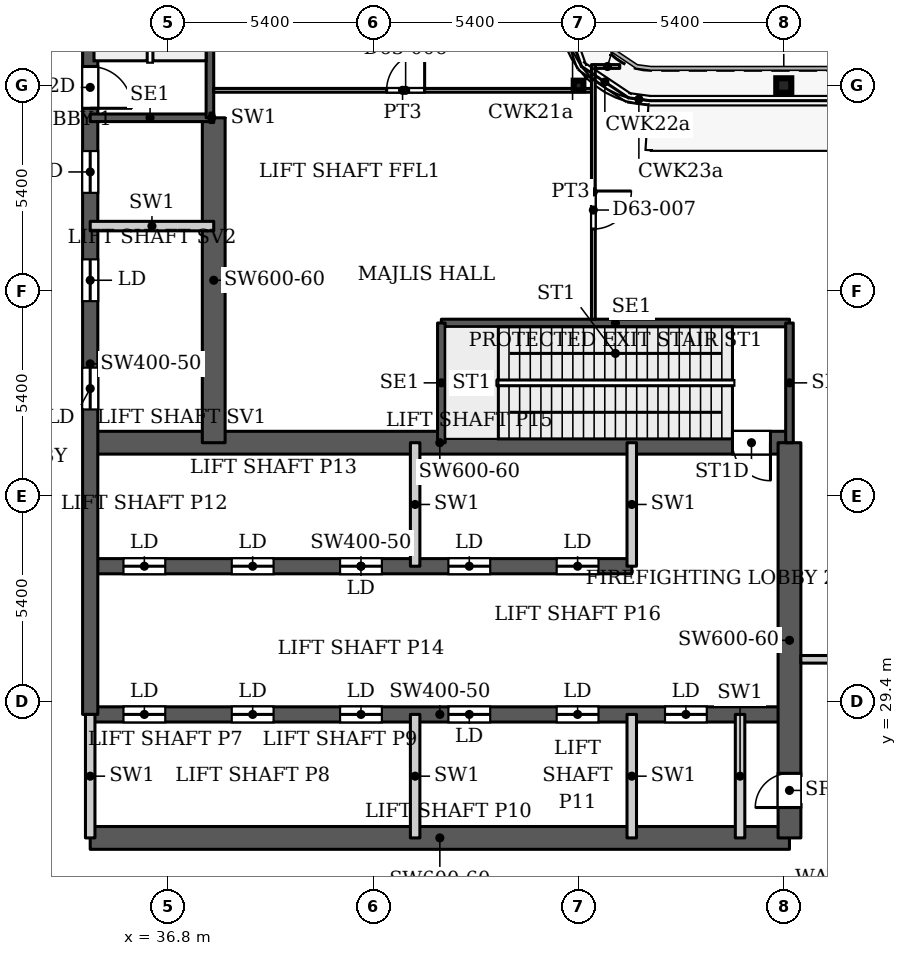
"""IFC4 building model, lengths in metres.
Left out: names, types, materials, properties, quantities, classifications, styles, units other than length and angle.
Written with IfcOpenShell. Run it as: python <this file> out.ifc"""

import sys

from ifc_helpers import new_model, si_unit, direction, frame, frame_2d, origin, origin_2d, place, context, subcontext, project, spatial, rectangle, hollow_rectangle, i_section, extrude, source, transform, mapped, element, fill, save


model = new_model("IFC4")
c1 = context("Model", 3, precision=1e-05, world=origin(), true_north=direction((0.0, 1.0)))
c2 = subcontext(c1, "Body", "Model", "MODEL_VIEW")
j1 = project(units=[si_unit("LENGTHUNIT", "METRE"), si_unit("PLANEANGLEUNIT", "RADIAN")], contexts=[c1])
p1 = place(None, origin())
s1 = spatial("IfcSite", under=j1, at=p1, CompositionType="ELEMENT")
p2 = place(p1, origin())
s2 = spatial("IfcBuilding", under=s1, at=p2, CompositionType="ELEMENT")
p3 = place(p2, frame((0.0, 0.0, 266.9)))
s3 = spatial("IfcBuildingStorey", under=s2, at=p3, CompositionType="ELEMENT", Elevation=266.9)
p4 = place(p3, frame((53.0, 45.6, 0.0), z_axis=(0.0, 0.0, 1.0), x_axis=(1.0, 0.0, 0.0)))
e1 = element("IfcColumn", 1, at=p4, inside=s3, PredefinedType="COLUMN", context=c2, shape_type="SweptSolid", body=[
    extrude(i_section(OverallWidth=0.395, OverallDepth=0.38, WebThickness=0.019, FlangeThickness=0.03, FilletRadius=0.011, at=origin_2d()), origin(), (0.0, 0.0, 1.0), 7.8),
])
p5 = place(p3, frame((47.6, 45.6, 0.0), z_axis=(0.0, 0.0, 1.0), x_axis=(1.0, 0.0, 0.0)))
e2 = element("IfcColumn", 2, at=p5, inside=s3, PredefinedType="COLUMN", context=c2, shape_type="SweptSolid", body=[
    extrude(hollow_rectangle(XDim=0.254, YDim=0.254, WallThickness=0.013, InnerFilletRadius=0.013, OuterFilletRadius=0.025, at=origin_2d()), origin(), (0.0, 0.0, 1.0), 7.8),
])
p6 = place(p3, frame((34.75, 25.8, 0.0), z_axis=(0.0, 0.0, 1.0), x_axis=(1.0, 0.0, 0.0)))
e3 = element("IfcWall", 3, at=p6, inside=s3, PredefinedType="SHEAR", context=c2, shape_type="SweptSolid", body=[
    extrude(rectangle(XDim=18.4, YDim=0.6, at=frame_2d((9.2, 0.0))), origin(), (0.0, 0.0, 1.0), 7.8),
])
p7 = place(p3, frame((34.75, 29.05, 0.0), z_axis=(0.0, 0.0, 1.0), x_axis=(1.0, 0.0, 0.0)))
e4 = element("IfcWall", 4, at=p7, inside=s3, PredefinedType="SHEAR", context=c2, shape_type="SweptSolid", body=[
    extrude(rectangle(XDim=18.4, YDim=0.4, at=frame_2d((9.2, 0.0))), origin(), (0.0, 0.0, 1.0), 7.8),
])
p8 = place(p7, frame((0.875, 0.0, 0.0)))
e5 = element("IfcOpeningElement", 5, at=p8, cuts=e4, PredefinedType="OPENING", context=c2, shape_type="SweptSolid", body=[
    extrude(rectangle(XDim=1.1, YDim=2.2, at=frame_2d((0.55, 1.1))), frame((0.0, 0.21, 0.0), z_axis=(0.0, -1.0, 0.0), x_axis=(1.0, 0.0, 0.0)), (0.0, 0.0, 1.0), 0.42),
])
p9 = place(p7, frame((3.725, 0.0, 0.0)))
e6 = element("IfcOpeningElement", 6, at=p9, cuts=e4, PredefinedType="OPENING", context=c2, shape_type="SweptSolid", body=[
    extrude(rectangle(XDim=1.1, YDim=2.2, at=frame_2d((0.55, 1.1))), frame((0.0, 0.21, 0.0), z_axis=(0.0, -1.0, 0.0), x_axis=(1.0, 0.0, 0.0)), (0.0, 0.0, 1.0), 0.42),
])
p10 = place(p7, frame((6.575, 0.0, 0.0)))
e7 = element("IfcOpeningElement", 7, at=p10, cuts=e4, PredefinedType="OPENING", context=c2, shape_type="SweptSolid", body=[
    extrude(rectangle(XDim=1.1, YDim=2.2, at=frame_2d((0.55, 1.1))), frame((0.0, 0.21, 0.0), z_axis=(0.0, -1.0, 0.0), x_axis=(1.0, 0.0, 0.0)), (0.0, 0.0, 1.0), 0.42),
])
p11 = place(p7, frame((9.425, 0.0, 0.0)))
e8 = element("IfcOpeningElement", 8, at=p11, cuts=e4, PredefinedType="OPENING", context=c2, shape_type="SweptSolid", body=[
    extrude(rectangle(XDim=1.1, YDim=2.2, at=frame_2d((0.55, 1.1))), frame((0.0, 0.21, 0.0), z_axis=(0.0, -1.0, 0.0), x_axis=(1.0, 0.0, 0.0)), (0.0, 0.0, 1.0), 0.42),
])
p12 = place(p7, frame((12.275, 0.0, 0.0)))
e9 = element("IfcOpeningElement", 9, at=p12, cuts=e4, PredefinedType="OPENING", context=c2, shape_type="SweptSolid", body=[
    extrude(rectangle(XDim=1.1, YDim=2.2, at=frame_2d((0.55, 1.1))), frame((0.0, 0.21, 0.0), z_axis=(0.0, -1.0, 0.0), x_axis=(1.0, 0.0, 0.0)), (0.0, 0.0, 1.0), 0.42),
])
p13 = place(p7, frame((15.125, 0.0, 0.0)))
e10 = element("IfcOpeningElement", 10, at=p13, cuts=e4, PredefinedType="OPENING", context=c2, shape_type="SweptSolid", body=[
    extrude(rectangle(XDim=1.1, YDim=2.2, at=frame_2d((0.55, 1.1))), frame((0.0, 0.21, 0.0), z_axis=(0.0, -1.0, 0.0), x_axis=(1.0, 0.0, 0.0)), (0.0, 0.0, 1.0), 0.42),
])
p14 = place(p3, frame((34.75, 32.95, 0.0), z_axis=(0.0, 0.0, 1.0), x_axis=(1.0, 0.0, 0.0)))
e11 = element("IfcWall", 11, at=p14, inside=s3, PredefinedType="SHEAR", context=c2, shape_type="SweptSolid", body=[
    extrude(rectangle(XDim=14.25, YDim=0.4, at=frame_2d((7.125, 0.0))), origin(), (0.0, 0.0, 1.0), 7.8),
])
p15 = place(p14, frame((0.875, 0.0, 0.0)))
e12 = element("IfcOpeningElement", 12, at=p15, cuts=e11, PredefinedType="OPENING", context=c2, shape_type="SweptSolid", body=[
    extrude(rectangle(XDim=1.1, YDim=2.2, at=frame_2d((0.55, 1.1))), frame((0.0, 0.21, 0.0), z_axis=(0.0, -1.0, 0.0), x_axis=(1.0, 0.0, 0.0)), (0.0, 0.0, 1.0), 0.42),
])
p16 = place(p14, frame((3.725, 0.0, 0.0)))
e13 = element("IfcOpeningElement", 13, at=p16, cuts=e11, PredefinedType="OPENING", context=c2, shape_type="SweptSolid", body=[
    extrude(rectangle(XDim=1.1, YDim=2.2, at=frame_2d((0.55, 1.1))), frame((0.0, 0.21, 0.0), z_axis=(0.0, -1.0, 0.0), x_axis=(1.0, 0.0, 0.0)), (0.0, 0.0, 1.0), 0.42),
])
p17 = place(p14, frame((6.575, 0.0, 0.0)))
e14 = element("IfcOpeningElement", 14, at=p17, cuts=e11, PredefinedType="OPENING", context=c2, shape_type="SweptSolid", body=[
    extrude(rectangle(XDim=1.1, YDim=2.2, at=frame_2d((0.55, 1.1))), frame((0.0, 0.21, 0.0), z_axis=(0.0, -1.0, 0.0), x_axis=(1.0, 0.0, 0.0)), (0.0, 0.0, 1.0), 0.42),
])
p18 = place(p14, frame((9.425, 0.0, 0.0)))
e15 = element("IfcOpeningElement", 15, at=p18, cuts=e11, PredefinedType="OPENING", context=c2, shape_type="SweptSolid", body=[
    extrude(rectangle(XDim=1.1, YDim=2.2, at=frame_2d((0.55, 1.1))), frame((0.0, 0.21, 0.0), z_axis=(0.0, -1.0, 0.0), x_axis=(1.0, 0.0, 0.0)), (0.0, 0.0, 1.0), 0.42),
])
p19 = place(p14, frame((12.275, 0.0, 0.0)))
e16 = element("IfcOpeningElement", 16, at=p19, cuts=e11, PredefinedType="OPENING", context=c2, shape_type="SweptSolid", body=[
    extrude(rectangle(XDim=1.1, YDim=2.2, at=frame_2d((0.55, 1.1))), frame((0.0, 0.21, 0.0), z_axis=(0.0, -1.0, 0.0), x_axis=(1.0, 0.0, 0.0)), (0.0, 0.0, 1.0), 0.42),
])
p20 = place(p3, frame((34.75, 36.2, 0.0), z_axis=(0.0, 0.0, 1.0), x_axis=(1.0, 0.0, 0.0)))
e17 = element("IfcWall", 17, at=p20, inside=s3, PredefinedType="SHEAR", context=c2, shape_type="SweptSolid", body=[
    extrude(rectangle(XDim=18.4, YDim=0.6, at=frame_2d((9.2, 0.0))), origin(), (0.0, 0.0, 1.0), 7.8),
])
p21 = place(p20, frame((16.9, 0.0, 0.0)))
e18 = element("IfcOpeningElement", 18, at=p21, cuts=e17, PredefinedType="OPENING", context=c2, shape_type="SweptSolid", body=[
    extrude(rectangle(XDim=1.0, YDim=2.2, at=frame_2d((0.5, 1.1))), frame((0.0, 0.31, 0.0), z_axis=(0.0, -1.0, 0.0), x_axis=(1.0, 0.0, 0.0)), (0.0, 0.0, 1.0), 0.62),
])
p22 = place(p3, frame((34.75, 29.05, 0.0), z_axis=(0.0, 0.0, 1.0), x_axis=(0.0, 1.0, 0.0)))
e19 = element("IfcWall", 19, at=p22, inside=s3, PredefinedType="SHEAR", context=c2, shape_type="SweptSolid", body=[
    extrude(rectangle(XDim=18.45, YDim=0.4, at=frame_2d((9.225, 0.0))), origin(), (0.0, 0.0, 1.0), 7.8),
])
p23 = place(p22, frame((8.025, 0.0, 0.0)))
e20 = element("IfcOpeningElement", 20, at=p23, cuts=e19, PredefinedType="OPENING", context=c2, shape_type="SweptSolid", body=[
    extrude(rectangle(XDim=1.1, YDim=2.2, at=frame_2d((0.55, 1.1))), frame((0.0, 0.21, 0.0), z_axis=(0.0, -1.0, 0.0), x_axis=(1.0, 0.0, 0.0)), (0.0, 0.0, 1.0), 0.42),
])
p24 = place(p22, frame((10.875, 0.0, 0.0)))
e21 = element("IfcOpeningElement", 21, at=p24, cuts=e19, PredefinedType="OPENING", context=c2, shape_type="SweptSolid", body=[
    extrude(rectangle(XDim=1.1, YDim=2.2, at=frame_2d((0.55, 1.1))), frame((0.0, 0.21, 0.0), z_axis=(0.0, -1.0, 0.0), x_axis=(1.0, 0.0, 0.0)), (0.0, 0.0, 1.0), 0.42),
])
p25 = place(p22, frame((13.725, 0.0, 0.0)))
e22 = element("IfcOpeningElement", 22, at=p25, cuts=e19, PredefinedType="OPENING", context=c2, shape_type="SweptSolid", body=[
    extrude(rectangle(XDim=1.1, YDim=2.2, at=frame_2d((0.55, 1.1))), frame((0.0, 0.21, 0.0), z_axis=(0.0, -1.0, 0.0), x_axis=(1.0, 0.0, 0.0)), (0.0, 0.0, 1.0), 0.42),
])
p26 = place(p22, frame((15.95, 0.0, 0.0)))
e23 = element("IfcOpeningElement", 23, at=p26, cuts=e19, PredefinedType="OPENING", context=c2, shape_type="SweptSolid", body=[
    extrude(rectangle(XDim=1.1, YDim=2.2, at=frame_2d((0.55, 1.1))), frame((0.0, 0.21, 0.0), z_axis=(0.0, -1.0, 0.0), x_axis=(1.0, 0.0, 0.0)), (0.0, 0.0, 1.0), 0.42),
])
p27 = place(p3, frame((38.0, 36.2, 0.0), z_axis=(0.0, 0.0, 1.0), x_axis=(0.0, 1.0, 0.0)))
e24 = element("IfcWall", 24, at=p27, inside=s3, PredefinedType="SHEAR", context=c2, shape_type="SweptSolid", body=[
    extrude(rectangle(XDim=8.55, YDim=0.6, at=frame_2d((4.275, 0.0))), origin(), (0.0, 0.0, 1.0), 7.8),
])
p28 = place(p3, frame((53.15, 25.8, 0.0), z_axis=(0.0, 0.0, 1.0), x_axis=(0.0, 1.0, 0.0)))
e25 = element("IfcWall", 25, at=p28, inside=s3, PredefinedType="SHEAR", context=c2, shape_type="SweptSolid", body=[
    extrude(rectangle(XDim=10.4, YDim=0.6, at=frame_2d((5.2, 0.0))), origin(), (0.0, 0.0, 1.0), 7.8),
])
p29 = place(p28, frame((0.8, 0.0, 0.0)))
e26 = element("IfcOpeningElement", 26, at=p29, cuts=e25, PredefinedType="OPENING", context=c2, shape_type="SweptSolid", body=[
    extrude(rectangle(XDim=0.9, YDim=2.2, at=frame_2d((0.45, 1.1))), frame((0.0, 0.31, 0.0), z_axis=(0.0, -1.0, 0.0), x_axis=(1.0, 0.0, 0.0)), (0.0, 0.0, 1.0), 0.62),
])
p30 = place(p3, frame((43.99, 39.35, 0.0), z_axis=(0.0, 0.0, 1.0), x_axis=(1.0, 0.0, 0.0)))
e27 = element("IfcWall", 27, at=p30, inside=s3, PredefinedType="SHEAR", context=c2, shape_type="SweptSolid", body=[
    extrude(rectangle(XDim=9.16, YDim=0.2, at=frame_2d((4.58, 0.0))), origin(), (0.0, 0.0, 1.0), 7.8),
])
for number, where, z_axis, x_axis in (
    (28, (43.99, 36.2, 0.0), (0.0, 0.0, 1.0), (0.0, 1.0, 0.0)),
    (29, (53.15, 36.2, 0.0), (0.0, 0.0, 1.0), (0.0, 1.0, 0.0)),
):
    element("IfcWall", number, at=place(p3, frame(where, z_axis=z_axis, x_axis=x_axis)), inside=s3, PredefinedType="SHEAR", context=c2, shape_type="SweptSolid", body=[
        extrude(rectangle(XDim=3.15, YDim=0.2, at=frame_2d((1.575, 0.0))), origin(), (0.0, 0.0, 1.0), 7.8),
    ])
p31 = place(p3, frame((34.75, 44.75, 0.0), z_axis=(0.0, 0.0, 1.0), x_axis=(1.0, 0.0, 0.0)))
e30 = element("IfcWall", 30, at=p31, inside=s3, PredefinedType="SHEAR", context=c2, shape_type="SweptSolid", body=[
    extrude(rectangle(XDim=3.15, YDim=0.2, at=frame_2d((1.575, 0.0))), origin(), (0.0, 0.0, 1.0), 7.8),
])
p32 = place(p3, frame((37.9, 44.75, 0.0), z_axis=(0.0, 0.0, 1.0), x_axis=(0.0, 1.0, 0.0)))
e31 = element("IfcWall", 31, at=p32, inside=s3, PredefinedType="SHEAR", context=c2, shape_type="SweptSolid", body=[
    extrude(rectangle(XDim=9.16, YDim=0.2, at=frame_2d((4.58, 0.0))), origin(), (0.0, 0.0, 1.0), 7.8),
])
for number, where, z_axis, x_axis in (
    (32, (34.75, 25.8, 0.0), (0.0, 0.0, 1.0), (0.0, 1.0, 0.0)),
    (33, (43.3, 25.8, 0.0), (0.0, 0.0, 1.0), (0.0, 1.0, 0.0)),
    (34, (43.3, 32.95, 0.0), (0.0, 0.0, 1.0), (0.0, 1.0, 0.0)),
    (35, (49.0, 25.8, 0.0), (0.0, 0.0, 1.0), (0.0, 1.0, 0.0)),
    (36, (49.0, 32.95, 0.0), (0.0, 0.0, 1.0), (0.0, 1.0, 0.0)),
    (37, (51.85, 25.8, 0.0), (0.0, 0.0, 1.0), (0.0, 1.0, 0.0)),
    (38, (34.75, 41.9, 0.0), (0.0, 0.0, 1.0), (1.0, 0.0, 0.0)),
):
    element("IfcWall", number, at=place(p3, frame(where, z_axis=z_axis, x_axis=x_axis)), inside=s3, PredefinedType="PARTITIONING", context=c2, shape_type="SweptSolid", body=[
        extrude(rectangle(XDim=3.25, YDim=0.25, at=frame_2d((1.625, 0.0))), origin(), (0.0, 0.0, 1.0), 7.8),
    ])
p33 = place(p3, frame((37.9, 44.75, 0.0), z_axis=(0.0, 0.0, 1.0), x_axis=(1.0, 0.0, 0.0)))
e39 = element("IfcWall", 39, at=p33, inside=s3, PredefinedType="PARTITIONING", context=c2, shape_type="SweptSolid", body=[
    extrude(rectangle(XDim=0.1, YDim=0.25, at=frame_2d((0.05, 0.0))), origin(), (0.0, 0.0, 1.0), 7.8),
])
p34 = place(p3, frame((37.999, 45.473, 0.0), z_axis=(0.0, 0.0, 1.0), x_axis=(1.0, 0.0, 0.0)))
e40 = element("IfcWall", 40, at=p34, inside=s3, PredefinedType="PARTITIONING", context=c2, shape_type="SweptSolid", body=[
    extrude(rectangle(XDim=9.941, YDim=0.1, at=frame_2d((4.97, 0.0))), origin(), (0.0, 0.0, 1.0), 7.5),
])
p35 = place(p34, frame((4.551, 0.0, 0.0)))
e41 = element("IfcOpeningElement", 41, at=p35, cuts=e40, PredefinedType="OPENING", context=c2, shape_type="SweptSolid", body=[
    extrude(rectangle(XDim=1.0, YDim=2.1, at=frame_2d((0.5, 1.05))), frame((0.0, 0.06, 0.0), z_axis=(0.0, -1.0, 0.0), x_axis=(1.0, 0.0, 0.0)), (0.0, 0.0, 1.0), 0.12),
])
p36 = place(p3, frame((47.99, 39.449, 0.0), z_axis=(0.0, 0.0, 1.0), x_axis=(0.0, 1.0, 0.0)))
e42 = element("IfcWall", 42, at=p36, inside=s3, PredefinedType="PARTITIONING", context=c2, shape_type="SweptSolid", body=[
    extrude(rectangle(XDim=6.701, YDim=0.1, at=frame_2d((3.351, 0.0))), origin(), (0.0, 0.0, 1.0), 7.5),
])
p37 = place(p36, frame((2.374, 0.0, 0.0)))
e43 = element("IfcOpeningElement", 43, at=p37, cuts=e42, PredefinedType="OPENING", context=c2, shape_type="SweptSolid", body=[
    extrude(rectangle(XDim=1.0, YDim=2.1, at=frame_2d((0.5, 1.05))), frame((0.0, 0.06, 0.0), z_axis=(0.0, -1.0, 0.0), x_axis=(1.0, 0.0, 0.0)), (0.0, 0.0, 1.0), 0.12),
])
p38 = place(p3, frame((48.04, 46.1, 0.0), z_axis=(0.0, 0.0, 1.0), x_axis=(1.0, 0.0, 0.0)))
e44 = element("IfcWall", 44, at=p38, inside=s3, PredefinedType="PARTITIONING", context=c2, shape_type="SweptSolid", body=[
    extrude(rectangle(XDim=0.644, YDim=0.1, at=frame_2d((0.322, 0.0))), origin(), (0.0, 0.0, 1.0), 7.5),
])
p39 = place(p3, frame((53.449, 30.5, 0.0), z_axis=(0.0, 0.0, 1.0), x_axis=(1.0, 0.0, 0.0)))
e45 = element("IfcWall", 45, at=p39, inside=s3, PredefinedType="PARTITIONING", context=c2, shape_type="SweptSolid", body=[
    extrude(rectangle(XDim=6.454, YDim=0.2, at=frame_2d((3.227, 0.0))), origin(), (0.0, 0.0, 1.0), 7.5),
])
p40 = place(p39, frame((2.153, 0.0, 0.0)))
e46 = element("IfcOpeningElement", 46, at=p40, cuts=e45, PredefinedType="OPENING", context=c2, shape_type="SweptSolid", body=[
    extrude(rectangle(XDim=1.8, YDim=2.1, at=frame_2d((0.9, 1.05))), frame((0.0, 0.11, 0.0), z_axis=(0.0, -1.0, 0.0), x_axis=(1.0, 0.0, 0.0)), (0.0, 0.0, 1.0), 0.22),
])
m1 = source(origin(), c2, "Body", "SweptSolid", [
    extrude(rectangle(XDim=1.1, YDim=2.2, at=frame_2d((0.55, 1.1))), frame((0.0, 0.025, 0.0), z_axis=(0.0, -1.0, 0.0), x_axis=(1.0, 0.0, 0.0)), (0.0, 0.0, 1.0), 0.05),
])
p41 = place(p8, origin())
e47 = element("IfcDoor", 47, at=p41, inside=s3, OperationType="SLIDING_TO_LEFT", PredefinedType="DOOR", context=c2, shape_type="MappedRepresentation", body=[
    mapped(m1, transform((0.0, 0.0, 0.0), x_axis=(1.0, 0.0, 0.0), y_axis=(0.0, 1.0, 0.0), z_axis=(0.0, 0.0, 1.0), scale=1.0)),
])
fill(e5, e47)
p42 = place(p9, origin())
e48 = element("IfcDoor", 48, at=p42, inside=s3, OperationType="SLIDING_TO_LEFT", PredefinedType="DOOR", context=c2, shape_type="MappedRepresentation", body=[
    mapped(m1, transform((0.0, 0.0, 0.0), x_axis=(1.0, 0.0, 0.0), y_axis=(0.0, 1.0, 0.0), z_axis=(0.0, 0.0, 1.0), scale=1.0)),
])
fill(e6, e48)
p43 = place(p10, origin())
e49 = element("IfcDoor", 49, at=p43, inside=s3, OperationType="SLIDING_TO_LEFT", PredefinedType="DOOR", context=c2, shape_type="MappedRepresentation", body=[
    mapped(m1, transform((0.0, 0.0, 0.0), x_axis=(1.0, 0.0, 0.0), y_axis=(0.0, 1.0, 0.0), z_axis=(0.0, 0.0, 1.0), scale=1.0)),
])
fill(e7, e49)
p44 = place(p11, origin())
e50 = element("IfcDoor", 50, at=p44, inside=s3, OperationType="SLIDING_TO_LEFT", PredefinedType="DOOR", context=c2, shape_type="MappedRepresentation", body=[
    mapped(m1, transform((0.0, 0.0, 0.0), x_axis=(1.0, 0.0, 0.0), y_axis=(0.0, 1.0, 0.0), z_axis=(0.0, 0.0, 1.0), scale=1.0)),
])
fill(e8, e50)
p45 = place(p12, origin())
e51 = element("IfcDoor", 51, at=p45, inside=s3, OperationType="SLIDING_TO_LEFT", PredefinedType="DOOR", context=c2, shape_type="MappedRepresentation", body=[
    mapped(m1, transform((0.0, 0.0, 0.0), x_axis=(1.0, 0.0, 0.0), y_axis=(0.0, 1.0, 0.0), z_axis=(0.0, 0.0, 1.0), scale=1.0)),
])
fill(e9, e51)
p46 = place(p15, origin())
e52 = element("IfcDoor", 52, at=p46, inside=s3, OperationType="SLIDING_TO_LEFT", PredefinedType="DOOR", context=c2, shape_type="MappedRepresentation", body=[
    mapped(m1, transform((0.0, 0.0, 0.0), x_axis=(1.0, 0.0, 0.0), y_axis=(0.0, 1.0, 0.0), z_axis=(0.0, 0.0, 1.0), scale=1.0)),
])
fill(e12, e52)
p47 = place(p16, origin())
e53 = element("IfcDoor", 53, at=p47, inside=s3, OperationType="SLIDING_TO_LEFT", PredefinedType="DOOR", context=c2, shape_type="MappedRepresentation", body=[
    mapped(m1, transform((0.0, 0.0, 0.0), x_axis=(1.0, 0.0, 0.0), y_axis=(0.0, 1.0, 0.0), z_axis=(0.0, 0.0, 1.0), scale=1.0)),
])
fill(e13, e53)
p48 = place(p17, origin())
e54 = element("IfcDoor", 54, at=p48, inside=s3, OperationType="SLIDING_TO_LEFT", PredefinedType="DOOR", context=c2, shape_type="MappedRepresentation", body=[
    mapped(m1, transform((0.0, 0.0, 0.0), x_axis=(1.0, 0.0, 0.0), y_axis=(0.0, 1.0, 0.0), z_axis=(0.0, 0.0, 1.0), scale=1.0)),
])
fill(e14, e54)
p49 = place(p18, origin())
e55 = element("IfcDoor", 55, at=p49, inside=s3, OperationType="SLIDING_TO_LEFT", PredefinedType="DOOR", context=c2, shape_type="MappedRepresentation", body=[
    mapped(m1, transform((0.0, 0.0, 0.0), x_axis=(1.0, 0.0, 0.0), y_axis=(0.0, 1.0, 0.0), z_axis=(0.0, 0.0, 1.0), scale=1.0)),
])
fill(e15, e55)
p50 = place(p19, origin())
e56 = element("IfcDoor", 56, at=p50, inside=s3, OperationType="SLIDING_TO_LEFT", PredefinedType="DOOR", context=c2, shape_type="MappedRepresentation", body=[
    mapped(m1, transform((0.0, 0.0, 0.0), x_axis=(1.0, 0.0, 0.0), y_axis=(0.0, 1.0, 0.0), z_axis=(0.0, 0.0, 1.0), scale=1.0)),
])
fill(e16, e56)
p51 = place(p23, origin())
e57 = element("IfcDoor", 57, at=p51, inside=s3, OperationType="SLIDING_TO_LEFT", PredefinedType="DOOR", context=c2, shape_type="MappedRepresentation", body=[
    mapped(m1, transform((0.0, 0.0, 0.0), x_axis=(1.0, 0.0, 0.0), y_axis=(0.0, 1.0, 0.0), z_axis=(0.0, 0.0, 1.0), scale=1.0)),
])
fill(e20, e57)
p52 = place(p24, origin())
e58 = element("IfcDoor", 58, at=p52, inside=s3, OperationType="SLIDING_TO_LEFT", PredefinedType="DOOR", context=c2, shape_type="MappedRepresentation", body=[
    mapped(m1, transform((0.0, 0.0, 0.0), x_axis=(1.0, 0.0, 0.0), y_axis=(0.0, 1.0, 0.0), z_axis=(0.0, 0.0, 1.0), scale=1.0)),
])
fill(e21, e58)
p53 = place(p25, origin())
e59 = element("IfcDoor", 59, at=p53, inside=s3, OperationType="SLIDING_TO_LEFT", PredefinedType="DOOR", context=c2, shape_type="MappedRepresentation", body=[
    mapped(m1, transform((0.0, 0.0, 0.0), x_axis=(1.0, 0.0, 0.0), y_axis=(0.0, 1.0, 0.0), z_axis=(0.0, 0.0, 1.0), scale=1.0)),
])
fill(e22, e59)
p54 = place(p13, origin())
e60 = element("IfcDoor", 60, at=p54, inside=s3, OperationType="SLIDING_TO_LEFT", PredefinedType="DOOR", context=c2, shape_type="MappedRepresentation", body=[
    mapped(m1, transform((0.0, 0.0, 0.0), x_axis=(1.0, 0.0, 0.0), y_axis=(0.0, 1.0, 0.0), z_axis=(0.0, 0.0, 1.0), scale=1.0)),
])
fill(e10, e60)
m2 = source(origin(), c2, "Body", "SweptSolid", [
    extrude(rectangle(XDim=0.9, YDim=2.2, at=frame_2d((0.45, 1.1))), frame((0.0, 0.025, 0.0), z_axis=(0.0, -1.0, 0.0), x_axis=(1.0, 0.0, 0.0)), (0.0, 0.0, 1.0), 0.05),
])
p55 = place(p29, origin())
e61 = element("IfcDoor", 61, at=p55, inside=s3, OperationType="SINGLE_SWING_LEFT", PredefinedType="DOOR", context=c2, shape_type="MappedRepresentation", body=[
    mapped(m2, transform((0.0, 0.0, 0.0), x_axis=(1.0, 0.0, 0.0), y_axis=(0.0, 1.0, 0.0), z_axis=(0.0, 0.0, 1.0), scale=1.0)),
])
fill(e26, e61)
m3 = source(origin(), c2, "Body", "SweptSolid", [
    extrude(rectangle(XDim=1.0, YDim=2.2, at=frame_2d((0.5, 1.1))), frame((0.0, 0.025, 0.0), z_axis=(0.0, -1.0, 0.0), x_axis=(1.0, 0.0, 0.0)), (0.0, 0.0, 1.0), 0.05),
])
p56 = place(p21, origin())
e62 = element("IfcDoor", 62, at=p56, inside=s3, OperationType="SINGLE_SWING_RIGHT", PredefinedType="DOOR", context=c2, shape_type="MappedRepresentation", body=[
    mapped(m3, transform((0.0, 0.0, 0.0), x_axis=(1.0, 0.0, 0.0), y_axis=(0.0, 1.0, 0.0), z_axis=(0.0, 0.0, 1.0), scale=1.0)),
])
fill(e18, e62)
m4 = source(origin(), c2, "Body", "SweptSolid", [
    extrude(rectangle(XDim=1.1, YDim=2.2, at=frame_2d((0.55, 1.1))), frame((0.0, 0.025, 0.0), z_axis=(0.0, -1.0, 0.0), x_axis=(1.0, 0.0, 0.0)), (0.0, 0.0, 1.0), 0.05),
])
p57 = place(p26, origin())
e63 = element("IfcDoor", 63, at=p57, inside=s3, OperationType="SINGLE_SWING_RIGHT", PredefinedType="DOOR", context=c2, shape_type="MappedRepresentation", body=[
    mapped(m4, transform((0.0, 0.0, 0.0), x_axis=(1.0, 0.0, 0.0), y_axis=(0.0, 1.0, 0.0), z_axis=(0.0, 0.0, 1.0), scale=1.0)),
])
fill(e23, e63)
m5 = source(origin(), c2, "Body", "SweptSolid", [
    extrude(rectangle(XDim=1.0, YDim=2.1, at=frame_2d((0.5, 1.05))), frame((0.0, 0.025, 0.0), z_axis=(0.0, -1.0, 0.0), x_axis=(1.0, 0.0, 0.0)), (0.0, 0.0, 1.0), 0.05),
])
p58 = place(p35, origin())
e64 = element("IfcDoor", 64, at=p58, inside=s3, OperationType="SINGLE_SWING_LEFT", PredefinedType="DOOR", context=c2, shape_type="MappedRepresentation", body=[
    mapped(m5, transform((0.0, 0.0, 0.0), x_axis=(1.0, 0.0, 0.0), y_axis=(0.0, 1.0, 0.0), z_axis=(0.0, 0.0, 1.0), scale=1.0)),
])
fill(e41, e64)
p59 = place(p37, origin())
e65 = element("IfcDoor", 65, at=p59, inside=s3, OperationType="SINGLE_SWING_RIGHT", PredefinedType="DOOR", context=c2, shape_type="MappedRepresentation", body=[
    mapped(m5, transform((0.0, 0.0, 0.0), x_axis=(1.0, 0.0, 0.0), y_axis=(0.0, 1.0, 0.0), z_axis=(0.0, 0.0, 1.0), scale=1.0)),
])
fill(e43, e65)
save(model, sys.argv[1])
